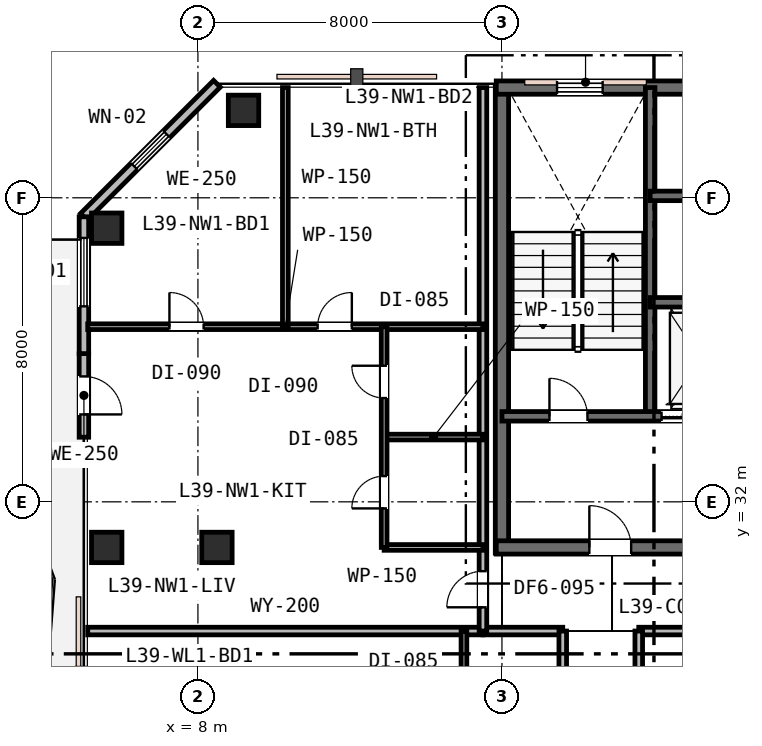
"""IFC4 building model, lengths in metres.
Left out: names, types, materials, properties, quantities, classifications, styles, units other than length and angle.
Written with IfcOpenShell. Run it as: python <this file> out.ifc"""

import sys

from ifc_helpers import new_model, si_unit, direction, frame, frame_2d, origin, origin_2d, place, context, subcontext, project, spatial, rectangle, extrude, element, fill, save


model = new_model("IFC4")
c1 = context("Model", 3, precision=1e-05, world=origin(), true_north=direction((0.0, 1.0)))
c2 = subcontext(c1, "Body", "Model", "MODEL_VIEW")
j1 = project(units=[si_unit("LENGTHUNIT", "METRE"), si_unit("PLANEANGLEUNIT", "RADIAN")], contexts=[c1])
p1 = place(None, origin())
s1 = spatial("IfcSite", under=j1, at=p1, CompositionType="ELEMENT")
p2 = place(p1, origin())
s2 = spatial("IfcBuilding", under=s1, at=p2, CompositionType="ELEMENT")
p3 = place(p2, frame((0.0, 0.0, 154.2)))
s3 = spatial("IfcBuildingStorey", under=s2, at=p3, CompositionType="ELEMENT", Elevation=154.2)
p4 = place(p3, frame((16.0, 30.65, 0.0), z_axis=(0.0, 0.0, 1.0), x_axis=(0.0, 1.0, 0.0)))
e1 = element("IfcWall", 1, at=p4, inside=s3, PredefinedType="SHEAR", context=c2, shape_type="SweptSolid", body=[
    extrude(rectangle(XDim=12.3, YDim=0.35, at=frame_2d((6.15, 0.0))), origin(), (0.0, 0.0, 1.0), 3.6),
])
p5 = place(p3, frame((15.85, 42.9, 0.0), z_axis=(0.0, 0.0, 1.0), x_axis=(1.0, 0.0, 0.0)))
e2 = element("IfcWall", 2, at=p5, inside=s3, PredefinedType="SHEAR", context=c2, shape_type="SweptSolid", body=[
    extrude(rectangle(XDim=24.3, YDim=0.35, at=frame_2d((12.15, 0.0))), origin(), (0.0, 0.0, 1.0), 3.6),
])
p6 = place(p5, frame((1.6, 0.0, 0.95)))
e3 = element("IfcOpeningElement", 3, at=p6, cuts=e2, PredefinedType="OPENING", context=c2, shape_type="SweptSolid", body=[
    extrude(rectangle(XDim=1.2, YDim=1.6, at=frame_2d((0.6, 0.8))), frame((0.0, 0.185, 0.0), z_axis=(0.0, -1.0, 0.0), x_axis=(1.0, 0.0, 0.0)), (0.0, 0.0, 1.0), 0.37),
])
p7 = place(p5, frame((16.5, 0.0, 0.95)))
e4 = element("IfcOpeningElement", 4, at=p7, cuts=e2, PredefinedType="OPENING", context=c2, shape_type="SweptSolid", body=[
    extrude(rectangle(XDim=1.2, YDim=1.6, at=frame_2d((0.6, 0.8))), frame((0.0, 0.185, 0.0), z_axis=(0.0, -1.0, 0.0), x_axis=(1.0, 0.0, 0.0)), (0.0, 0.0, 1.0), 0.37),
])
p8 = place(p5, frame((21.6, 0.0, 0.95)))
e5 = element("IfcOpeningElement", 5, at=p8, cuts=e2, PredefinedType="OPENING", context=c2, shape_type="SweptSolid", body=[
    extrude(rectangle(XDim=1.2, YDim=1.6, at=frame_2d((0.6, 0.8))), frame((0.0, 0.185, 0.0), z_axis=(0.0, -1.0, 0.0), x_axis=(1.0, 0.0, 0.0)), (0.0, 0.0, 1.0), 0.37),
])
p9 = place(p3, frame((15.85, 30.8, 0.0), z_axis=(0.0, 0.0, 1.0), x_axis=(1.0, 0.0, 0.0)))
e6 = element("IfcWall", 6, at=p9, inside=s3, PredefinedType="SHEAR", context=c2, shape_type="SweptSolid", body=[
    extrude(rectangle(XDim=11.2, YDim=0.35, at=frame_2d((5.6, 0.0))), origin(), (0.0, 0.0, 1.0), 3.6),
])
p10 = place(p9, frame((2.45, 0.0, 0.0)))
e7 = element("IfcOpeningElement", 7, at=p10, cuts=e6, PredefinedType="OPENING", context=c2, shape_type="SweptSolid", body=[
    extrude(rectangle(XDim=1.1, YDim=2.15, at=frame_2d((0.55, 1.075))), frame((0.0, 0.185, 0.0), z_axis=(0.0, -1.0, 0.0), x_axis=(1.0, 0.0, 0.0)), (0.0, 0.0, 1.0), 0.37),
])
p11 = place(p3, frame((19.9, 34.25, 0.0), z_axis=(0.0, 0.0, 1.0), x_axis=(0.0, 1.0, 0.0)))
e8 = element("IfcWall", 8, at=p11, inside=s3, PredefinedType="SHEAR", context=c2, shape_type="SweptSolid", body=[
    extrude(rectangle(XDim=8.65, YDim=0.25, at=frame_2d((4.325, 0.0))), origin(), (0.0, 0.0, 1.0), 3.6),
])
p12 = place(p3, frame((16.0, 34.25, 0.0), z_axis=(0.0, 0.0, 1.0), x_axis=(1.0, 0.0, 0.0)))
e9 = element("IfcWall", 9, at=p12, inside=s3, PredefinedType="SHEAR", context=c2, shape_type="SweptSolid", body=[
    extrude(rectangle(XDim=6.05, YDim=0.25, at=frame_2d((3.025, 0.0))), origin(), (0.0, 0.0, 1.0), 3.6),
])
p13 = place(p12, frame((1.25, 0.0, 0.0)))
e10 = element("IfcOpeningElement", 10, at=p13, cuts=e9, PredefinedType="OPENING", context=c2, shape_type="SweptSolid", body=[
    extrude(rectangle(XDim=1.0, YDim=2.15, at=frame_2d((0.5, 1.075))), frame((0.0, 0.135, 0.0), z_axis=(0.0, -1.0, 0.0), x_axis=(1.0, 0.0, 0.0)), (0.0, 0.0, 1.0), 0.27),
])
p14 = place(p12, frame((4.2, 0.0, 0.0)))
e11 = element("IfcOpeningElement", 11, at=p14, cuts=e9, PredefinedType="OPENING", context=c2, shape_type="SweptSolid", body=[
    extrude(rectangle(XDim=1.1, YDim=2.15, at=frame_2d((0.55, 1.075))), frame((0.0, 0.135, 0.0), z_axis=(0.0, -1.0, 0.0), x_axis=(1.0, 0.0, 0.0)), (0.0, 0.0, 1.0), 0.27),
])
p15 = place(p3, frame((19.9, 37.25, 0.0), z_axis=(0.0, 0.0, 1.0), x_axis=(1.0, 0.0, 0.0)))
e12 = element("IfcWall", 12, at=p15, inside=s3, PredefinedType="SHEAR", context=c2, shape_type="SweptSolid", body=[
    extrude(rectangle(XDim=16.2, YDim=0.25, at=frame_2d((8.1, 0.0))), origin(), (0.0, 0.0, 1.0), 3.6),
])
p16 = place(p15, frame((12.55, 0.0, 0.0)))
e13 = element("IfcOpeningElement", 13, at=p16, cuts=e12, PredefinedType="OPENING", context=c2, shape_type="SweptSolid", body=[
    extrude(rectangle(XDim=0.9, YDim=2.15, at=frame_2d((0.45, 1.075))), frame((0.0, 0.135, 0.0), z_axis=(0.0, -1.0, 0.0), x_axis=(1.0, 0.0, 0.0)), (0.0, 0.0, 1.0), 0.27),
])
p17 = place(p15, frame((2.5, 0.0, 0.0)))
e14 = element("IfcOpeningElement", 14, at=p17, cuts=e12, PredefinedType="OPENING", context=c2, shape_type="SweptSolid", body=[
    extrude(rectangle(XDim=1.05, YDim=2.15, at=frame_2d((0.525, 1.075))), frame((0.0, 0.135, 0.0), z_axis=(0.0, -1.0, 0.0), x_axis=(1.0, 0.0, 0.0)), (0.0, 0.0, 1.0), 0.27),
])
p18 = place(p15, frame((4.4, 0.0, 0.0)))
e15 = element("IfcOpeningElement", 15, at=p18, cuts=e12, PredefinedType="OPENING", context=c2, shape_type="SweptSolid", body=[
    extrude(rectangle(XDim=1.05, YDim=2.15, at=frame_2d((0.525, 1.075))), frame((0.0, 0.135, 0.0), z_axis=(0.0, -1.0, 0.0), x_axis=(1.0, 0.0, 0.0)), (0.0, 0.0, 1.0), 0.27),
])
p19 = place(p15, frame((6.3, 0.0, 0.0)))
e16 = element("IfcOpeningElement", 16, at=p19, cuts=e12, PredefinedType="OPENING", context=c2, shape_type="SweptSolid", body=[
    extrude(rectangle(XDim=1.05, YDim=2.15, at=frame_2d((0.525, 1.075))), frame((0.0, 0.135, 0.0), z_axis=(0.0, -1.0, 0.0), x_axis=(1.0, 0.0, 0.0)), (0.0, 0.0, 1.0), 0.27),
])
p20 = place(p3, frame((19.9, 40.05, 0.0), z_axis=(0.0, 0.0, 1.0), x_axis=(1.0, 0.0, 0.0)))
e17 = element("IfcWall", 17, at=p20, inside=s3, PredefinedType="SHEAR", context=c2, shape_type="SweptSolid", body=[
    extrude(rectangle(XDim=12.05, YDim=0.25, at=frame_2d((6.025, 0.0))), origin(), (0.0, 0.0, 1.0), 3.6),
])
for number, where, z_axis, x_axis in (
    (18, (5.6, 30.8, 0.0), (0.0, 0.0, 1.0), (1.0, 0.0, 0.0)),
    (19, (5.6, 39.2, 0.0), (0.0, 0.0, 1.0), (1.0, 0.0, 0.0)),
    (20, (8.5, 30.8, 0.0), (0.0, 0.0, 1.0), (1.0, 0.0, 0.0)),
    (21, (9.2, 42.3, 0.0), (0.0, 0.0, 1.0), (1.0, 0.0, 0.0)),
):
    element("IfcColumn", number, at=place(p3, frame(where, z_axis=z_axis, x_axis=x_axis)), inside=s3, PredefinedType="COLUMN", context=c2, shape_type="SweptSolid", body=[
        extrude(rectangle(XDim=0.8, YDim=0.8, at=origin_2d()), origin(), (0.0, 0.0, 1.0), 3.6),
    ])
p21 = place(p3, frame((8.5, 43.0, 0.0), z_axis=(0.0, 0.0, 1.0), x_axis=(-0.707106781187, -0.707106781187, 0.0)))
e22 = element("IfcWall", 22, at=p21, inside=s3, PredefinedType="STANDARD", context=c2, shape_type="SweptSolid", body=[
    extrude(rectangle(XDim=4.95, YDim=0.25, at=frame_2d((2.475, 0.0))), origin(), (0.0, 0.0, 1.0), 3.33),
])
p22 = place(p21, frame((1.875, 0.0, 0.85)))
e23 = element("IfcOpeningElement", 23, at=p22, cuts=e22, PredefinedType="OPENING", context=c2, shape_type="SweptSolid", body=[
    extrude(rectangle(XDim=1.2, YDim=1.6, at=frame_2d((0.6, 0.8))), frame((0.0, 0.135, 0.0), z_axis=(0.0, -1.0, 0.0), x_axis=(1.0, 0.0, 0.0)), (0.0, 0.0, 1.0), 0.27),
])
p23 = place(p3, frame((5.0, 35.9, 0.0), z_axis=(0.0, 0.0, 1.0), x_axis=(0.0, -1.0, 0.0)))
e24 = element("IfcWall", 24, at=p23, inside=s3, PredefinedType="STANDARD", context=c2, shape_type="SweptSolid", body=[
    extrude(rectangle(XDim=2.2, YDim=0.25, at=frame_2d((1.1, 0.0))), origin(), (0.0, 0.0, 1.0), 3.33),
])
p24 = place(p23, frame((0.6, 0.0, 0.0)))
e25 = element("IfcOpeningElement", 25, at=p24, cuts=e24, PredefinedType="OPENING", context=c2, shape_type="SweptSolid", body=[
    extrude(rectangle(XDim=1.0, YDim=2.15, at=frame_2d((0.5, 1.075))), frame((0.0, 0.135, 0.0), z_axis=(0.0, -1.0, 0.0), x_axis=(1.0, 0.0, 0.0)), (0.0, 0.0, 1.0), 0.27),
])
p25 = place(p3, frame((5.0, 39.5, 0.0), z_axis=(0.0, 0.0, 1.0), x_axis=(0.0, -1.0, 0.0)))
e26 = element("IfcWall", 26, at=p25, inside=s3, PredefinedType="STANDARD", context=c2, shape_type="SweptSolid", body=[
    extrude(rectangle(XDim=3.6, YDim=0.25, at=frame_2d((1.8, 0.0))), origin(), (0.0, 0.0, 1.0), 3.33),
])
p26 = place(p25, frame((0.556, 0.0, 0.75)))
e27 = element("IfcOpeningElement", 27, at=p26, cuts=e26, PredefinedType="OPENING", context=c2, shape_type="SweptSolid", body=[
    extrude(rectangle(XDim=1.8, YDim=1.85, at=frame_2d((0.9, 0.925))), frame((0.0, 0.135, 0.0), z_axis=(0.0, -1.0, 0.0), x_axis=(1.0, 0.0, 0.0)), (0.0, 0.0, 1.0), 0.27),
])
p27 = place(p3, frame((5.1, 28.6, 0.0), z_axis=(0.0, 0.0, 1.0), x_axis=(1.0, 0.0, 0.0)))
e28 = element("IfcWall", 28, at=p27, inside=s3, PredefinedType="PARTITIONING", context=c2, shape_type="SweptSolid", body=[
    extrude(rectangle(XDim=10.4, YDim=0.2, at=frame_2d((5.2, 0.0))), origin(), (0.0, 0.0, 1.0), 2.93),
])
p28 = place(p3, frame((15.5, 28.6, 0.0), z_axis=(0.0, 0.0, 1.0), x_axis=(1.0, 0.0, 0.0)))
e29 = element("IfcWall", 29, at=p28, inside=s3, PredefinedType="PARTITIONING", context=c2, shape_type="SweptSolid", body=[
    extrude(rectangle(XDim=2.1, YDim=0.2, at=frame_2d((1.05, 0.0))), origin(), (0.0, 0.0, 1.0), 2.93),
])
p29 = place(p3, frame((19.6, 28.6, 0.0), z_axis=(0.0, 0.0, 1.0), x_axis=(1.0, 0.0, 0.0)))
e30 = element("IfcWall", 30, at=p29, inside=s3, PredefinedType="PARTITIONING", context=c2, shape_type="SweptSolid", body=[
    extrude(rectangle(XDim=31.3, YDim=0.2, at=frame_2d((15.65, 0.0))), origin(), (0.0, 0.0, 1.0), 2.93),
])
p30 = place(p29, frame((5.445, 0.0, 0.0)))
e31 = element("IfcOpeningElement", 31, at=p30, cuts=e30, PredefinedType="OPENING", context=c2, shape_type="SweptSolid", body=[
    extrude(rectangle(XDim=0.95, YDim=2.15, at=frame_2d((0.475, 1.075))), frame((0.0, 0.11, 0.0), z_axis=(0.0, -1.0, 0.0), x_axis=(1.0, 0.0, 0.0)), (0.0, 0.0, 1.0), 0.22),
])
p31 = place(p29, frame((13.35, 0.0, 0.0)))
e32 = element("IfcOpeningElement", 32, at=p31, cuts=e30, PredefinedType="OPENING", context=c2, shape_type="SweptSolid", body=[
    extrude(rectangle(XDim=0.95, YDim=2.15, at=frame_2d((0.475, 1.075))), frame((0.0, 0.11, 0.0), z_axis=(0.0, -1.0, 0.0), x_axis=(1.0, 0.0, 0.0)), (0.0, 0.0, 1.0), 0.22),
])
p32 = place(p29, frame((21.925, 0.0, 0.0)))
e33 = element("IfcOpeningElement", 33, at=p32, cuts=e30, PredefinedType="OPENING", context=c2, shape_type="SweptSolid", body=[
    extrude(rectangle(XDim=0.95, YDim=2.15, at=frame_2d((0.475, 1.075))), frame((0.0, 0.11, 0.0), z_axis=(0.0, -1.0, 0.0), x_axis=(1.0, 0.0, 0.0)), (0.0, 0.0, 1.0), 0.22),
])
p33 = place(p3, frame((15.5, 28.6, 0.0), z_axis=(0.0, 0.0, 1.0), x_axis=(0.0, 1.0, 0.0)))
e34 = element("IfcWall", 34, at=p33, inside=s3, PredefinedType="PARTITIONING", context=c2, shape_type="SweptSolid", body=[
    extrude(rectangle(XDim=14.3, YDim=0.2, at=frame_2d((7.15, 0.0))), origin(), (0.0, 0.0, 1.0), 2.93),
])
p34 = place(p33, frame((0.625, 0.0, 0.0)))
e35 = element("IfcOpeningElement", 35, at=p34, cuts=e34, PredefinedType="OPENING", context=c2, shape_type="SweptSolid", body=[
    extrude(rectangle(XDim=0.95, YDim=2.15, at=frame_2d((0.475, 1.075))), frame((0.0, 0.11, 0.0), z_axis=(0.0, -1.0, 0.0), x_axis=(1.0, 0.0, 0.0)), (0.0, 0.0, 1.0), 0.22),
])
p35 = place(p3, frame((12.9, 30.8, 0.0), z_axis=(0.0, 0.0, 1.0), x_axis=(1.0, 0.0, 0.0)))
e36 = element("IfcWall", 36, at=p35, inside=s3, PredefinedType="PARTITIONING", context=c2, shape_type="SweptSolid", body=[
    extrude(rectangle(XDim=2.6, YDim=0.15, at=frame_2d((1.3, 0.0))), origin(), (0.0, 0.0, 1.0), 2.93),
])
p36 = place(p3, frame((12.9, 33.704, 0.0), z_axis=(0.0, 0.0, 1.0), x_axis=(1.0, 0.0, 0.0)))
e37 = element("IfcWall", 37, at=p36, inside=s3, PredefinedType="PARTITIONING", context=c2, shape_type="SweptSolid", body=[
    extrude(rectangle(XDim=2.6, YDim=0.15, at=frame_2d((1.3, 0.0))), origin(), (0.0, 0.0, 1.0), 3.33),
])
p37 = place(p3, frame((5.1, 36.608, 0.0), z_axis=(0.0, 0.0, 1.0), x_axis=(1.0, 0.0, 0.0)))
e38 = element("IfcWall", 38, at=p37, inside=s3, PredefinedType="PARTITIONING", context=c2, shape_type="SweptSolid", body=[
    extrude(rectangle(XDim=10.4, YDim=0.15, at=frame_2d((5.2, 0.0))), origin(), (0.0, 0.0, 1.0), 3.01),
])
p38 = place(p37, frame((2.15, 0.0, 0.0)))
e39 = element("IfcOpeningElement", 39, at=p38, cuts=e38, PredefinedType="OPENING", context=c2, shape_type="SweptSolid", body=[
    extrude(rectangle(XDim=0.9, YDim=2.15, at=frame_2d((0.45, 1.075))), frame((0.0, 0.085, 0.0), z_axis=(0.0, -1.0, 0.0), x_axis=(1.0, 0.0, 0.0)), (0.0, 0.0, 1.0), 0.17),
])
p39 = place(p37, frame((6.05, 0.0, 0.0)))
e40 = element("IfcOpeningElement", 40, at=p39, cuts=e38, PredefinedType="OPENING", context=c2, shape_type="SweptSolid", body=[
    extrude(rectangle(XDim=0.9, YDim=2.15, at=frame_2d((0.45, 1.075))), frame((0.0, 0.085, 0.0), z_axis=(0.0, -1.0, 0.0), x_axis=(1.0, 0.0, 0.0)), (0.0, 0.0, 1.0), 0.17),
])
p40 = place(p3, frame((12.9, 30.8, 0.0), z_axis=(0.0, 0.0, 1.0), x_axis=(0.0, 1.0, 0.0)))
e41 = element("IfcWall", 41, at=p40, inside=s3, PredefinedType="PARTITIONING", context=c2, shape_type="SweptSolid", body=[
    extrude(rectangle(XDim=5.808, YDim=0.15, at=frame_2d((2.904, 0.0))), origin(), (0.0, 0.0, 1.0), 2.93),
])
p41 = place(p40, frame((1.027, 0.0, 0.0)))
e42 = element("IfcOpeningElement", 42, at=p41, cuts=e41, PredefinedType="OPENING", context=c2, shape_type="SweptSolid", body=[
    extrude(rectangle(XDim=0.85, YDim=2.15, at=frame_2d((0.425, 1.075))), frame((0.0, 0.085, 0.0), z_axis=(0.0, -1.0, 0.0), x_axis=(1.0, 0.0, 0.0)), (0.0, 0.0, 1.0), 0.17),
])
p42 = place(p40, frame((3.931, 0.0, 0.0)))
e43 = element("IfcOpeningElement", 43, at=p42, cuts=e41, PredefinedType="OPENING", context=c2, shape_type="SweptSolid", body=[
    extrude(rectangle(XDim=0.85, YDim=2.15, at=frame_2d((0.425, 1.075))), frame((0.0, 0.085, 0.0), z_axis=(0.0, -1.0, 0.0), x_axis=(1.0, 0.0, 0.0)), (0.0, 0.0, 1.0), 0.17),
])
p43 = place(p3, frame((10.3, 36.608, 0.0), z_axis=(0.0, 0.0, 1.0), x_axis=(0.0, 1.0, 0.0)))
e44 = element("IfcWall", 44, at=p43, inside=s3, PredefinedType="PARTITIONING", context=c2, shape_type="SweptSolid", body=[
    extrude(rectangle(XDim=6.292, YDim=0.15, at=frame_2d((3.146, 0.0))), origin(), (0.0, 0.0, 1.0), 3.33),
])
p44 = place(p3, frame((17.6, 17.0, 0.0), z_axis=(0.0, 0.0, 1.0), x_axis=(0.0, 1.0, 0.0)))
e45 = element("IfcWall", 45, at=p44, inside=s3, PredefinedType="PARTITIONING", context=c2, shape_type="SweptSolid", body=[
    extrude(rectangle(XDim=11.6, YDim=0.2, at=frame_2d((5.8, 0.0))), origin(), (0.0, 0.0, 1.0), 2.93),
])
p45 = place(p44, frame((0.723, 0.0, 0.0)))
e46 = element("IfcOpeningElement", 46, at=p45, cuts=e45, PredefinedType="OPENING", context=c2, shape_type="SweptSolid", body=[
    extrude(rectangle(XDim=0.95, YDim=2.15, at=frame_2d((0.475, 1.075))), frame((0.0, 0.11, 0.0), z_axis=(0.0, -1.0, 0.0), x_axis=(1.0, 0.0, 0.0)), (0.0, 0.0, 1.0), 0.22),
])
p46 = place(p3, frame((15.0, 19.396, 0.0), z_axis=(0.0, 0.0, 1.0), x_axis=(0.0, 1.0, 0.0)))
e47 = element("IfcWall", 47, at=p46, inside=s3, PredefinedType="PARTITIONING", context=c2, shape_type="SweptSolid", body=[
    extrude(rectangle(XDim=9.204, YDim=0.15, at=frame_2d((4.602, 0.0))), origin(), (0.0, 0.0, 1.0), 2.93),
])
p47 = place(p46, frame((0.6, 0.0, 0.0)))
e48 = element("IfcOpeningElement", 48, at=p47, cuts=e47, PredefinedType="OPENING", context=c2, shape_type="SweptSolid", body=[
    extrude(rectangle(XDim=0.85, YDim=2.15, at=frame_2d((0.425, 1.075))), frame((0.0, 0.085, 0.0), z_axis=(0.0, -1.0, 0.0), x_axis=(1.0, 0.0, 0.0)), (0.0, 0.0, 1.0), 0.17),
])
p48 = place(p46, frame((2.65, 0.0, 0.0)))
e49 = element("IfcOpeningElement", 49, at=p48, cuts=e47, PredefinedType="OPENING", context=c2, shape_type="SweptSolid", body=[
    extrude(rectangle(XDim=0.85, YDim=2.15, at=frame_2d((0.425, 1.075))), frame((0.0, 0.085, 0.0), z_axis=(0.0, -1.0, 0.0), x_axis=(1.0, 0.0, 0.0)), (0.0, 0.0, 1.0), 0.17),
])
p49 = place(p46, frame((6.593, 0.0, 0.0)))
e50 = element("IfcOpeningElement", 50, at=p49, cuts=e47, PredefinedType="OPENING", context=c2, shape_type="SweptSolid", body=[
    extrude(rectangle(XDim=0.85, YDim=2.15, at=frame_2d((0.425, 1.075))), frame((0.0, 0.085, 0.0), z_axis=(0.0, -1.0, 0.0), x_axis=(1.0, 0.0, 0.0)), (0.0, 0.0, 1.0), 0.17),
])
p50 = place(p3, frame((19.6, 17.0, 0.0), z_axis=(0.0, 0.0, 1.0), x_axis=(0.0, 1.0, 0.0)))
e51 = element("IfcWall", 51, at=p50, inside=s3, PredefinedType="PARTITIONING", context=c2, shape_type="SweptSolid", body=[
    extrude(rectangle(XDim=11.6, YDim=0.2, at=frame_2d((5.8, 0.0))), origin(), (0.0, 0.0, 1.0), 2.93),
])
p51 = place(p50, frame((3.125, 0.0, 0.0)))
e52 = element("IfcOpeningElement", 52, at=p51, cuts=e51, PredefinedType="OPENING", context=c2, shape_type="SweptSolid", body=[
    extrude(rectangle(XDim=0.95, YDim=2.15, at=frame_2d((0.475, 1.075))), frame((0.0, 0.11, 0.0), z_axis=(0.0, -1.0, 0.0), x_axis=(1.0, 0.0, 0.0)), (0.0, 0.0, 1.0), 0.22),
])
p52 = place(p6, origin())
e53 = element("IfcWindow", 53, at=p52, inside=s3, PartitioningType="SINGLE_PANEL", PredefinedType="WINDOW", context=c2, shape_type="SweptSolid", body=[
    extrude(rectangle(XDim=1.2, YDim=1.6, at=frame_2d((0.6, 0.8))), frame((0.0, 0.03, 0.0), z_axis=(0.0, -1.0, 0.0), x_axis=(1.0, 0.0, 0.0)), (0.0, 0.0, 1.0), 0.06),
])
fill(e3, e53)
p53 = place(p22, origin())
e54 = element("IfcWindow", 54, at=p53, inside=s3, PartitioningType="SINGLE_PANEL", PredefinedType="WINDOW", context=c2, shape_type="SweptSolid", body=[
    extrude(rectangle(XDim=1.2, YDim=1.6, at=frame_2d((0.6, 0.8))), frame((0.0, 0.03, 0.0), z_axis=(0.0, -1.0, 0.0), x_axis=(1.0, 0.0, 0.0)), (0.0, 0.0, 1.0), 0.06),
])
fill(e23, e54)
p54 = place(p24, origin())
e55 = element("IfcDoor", 55, at=p54, inside=s3, OperationType="SINGLE_SWING_RIGHT", PredefinedType="DOOR", context=c2, shape_type="SweptSolid", body=[
    extrude(rectangle(XDim=1.0, YDim=2.15, at=frame_2d((0.5, 1.075))), frame((0.0, 0.025, 0.0), z_axis=(0.0, -1.0, 0.0), x_axis=(1.0, 0.0, 0.0)), (0.0, 0.0, 1.0), 0.05),
])
fill(e25, e55)
p55 = place(p26, origin())
e56 = element("IfcWindow", 56, at=p55, inside=s3, PartitioningType="SINGLE_PANEL", PredefinedType="WINDOW", context=c2, shape_type="SweptSolid", body=[
    extrude(rectangle(XDim=1.8, YDim=1.85, at=frame_2d((0.9, 0.925))), frame((0.0, 0.03, 0.0), z_axis=(0.0, -1.0, 0.0), x_axis=(1.0, 0.0, 0.0)), (0.0, 0.0, 1.0), 0.06),
])
fill(e27, e56)
p56 = place(p13, origin())
e57 = element("IfcDoor", 57, at=p56, inside=s3, OperationType="SINGLE_SWING_LEFT", PredefinedType="DOOR", context=c2, shape_type="SweptSolid", body=[
    extrude(rectangle(XDim=1.0, YDim=2.15, at=frame_2d((0.5, 1.075))), frame((0.0, 0.025, 0.0), z_axis=(0.0, -1.0, 0.0), x_axis=(1.0, 0.0, 0.0)), (0.0, 0.0, 1.0), 0.05),
])
fill(e10, e57)
p57 = place(p10, origin())
e58 = element("IfcDoor", 58, at=p57, inside=s3, OperationType="SINGLE_SWING_LEFT", PredefinedType="DOOR", context=c2, shape_type="SweptSolid", body=[
    extrude(rectangle(XDim=1.1, YDim=2.15, at=frame_2d((0.55, 1.075))), frame((0.0, 0.025, 0.0), z_axis=(0.0, -1.0, 0.0), x_axis=(1.0, 0.0, 0.0)), (0.0, 0.0, 1.0), 0.05),
])
fill(e7, e58)
p58 = place(p34, origin())
e59 = element("IfcDoor", 59, at=p58, inside=s3, OperationType="SINGLE_SWING_LEFT", PredefinedType="DOOR", context=c2, shape_type="SweptSolid", body=[
    extrude(rectangle(XDim=0.95, YDim=2.15, at=frame_2d((0.475, 1.075))), frame((0.0, 0.025, 0.0), z_axis=(0.0, -1.0, 0.0), x_axis=(1.0, 0.0, 0.0)), (0.0, 0.0, 1.0), 0.05),
])
fill(e35, e59)
p59 = place(p41, origin())
e60 = element("IfcDoor", 60, at=p59, inside=s3, OperationType="SINGLE_SWING_LEFT", PredefinedType="DOOR", context=c2, shape_type="SweptSolid", body=[
    extrude(rectangle(XDim=0.85, YDim=2.15, at=frame_2d((0.425, 1.075))), frame((0.0, 0.025, 0.0), z_axis=(0.0, -1.0, 0.0), x_axis=(1.0, 0.0, 0.0)), (0.0, 0.0, 1.0), 0.05),
])
fill(e42, e60)
p60 = place(p42, origin())
e61 = element("IfcDoor", 61, at=p60, inside=s3, OperationType="SINGLE_SWING_RIGHT", PredefinedType="DOOR", context=c2, shape_type="SweptSolid", body=[
    extrude(rectangle(XDim=0.85, YDim=2.15, at=frame_2d((0.425, 1.075))), frame((0.0, 0.025, 0.0), z_axis=(0.0, -1.0, 0.0), x_axis=(1.0, 0.0, 0.0)), (0.0, 0.0, 1.0), 0.05),
])
fill(e43, e61)
p61 = place(p38, origin())
e62 = element("IfcDoor", 62, at=p61, inside=s3, OperationType="SINGLE_SWING_LEFT", PredefinedType="DOOR", context=c2, shape_type="SweptSolid", body=[
    extrude(rectangle(XDim=0.9, YDim=2.15, at=frame_2d((0.45, 1.075))), frame((0.0, 0.025, 0.0), z_axis=(0.0, -1.0, 0.0), x_axis=(1.0, 0.0, 0.0)), (0.0, 0.0, 1.0), 0.05),
])
fill(e39, e62)
p62 = place(p39, origin())
e63 = element("IfcDoor", 63, at=p62, inside=s3, OperationType="SINGLE_SWING_RIGHT", PredefinedType="DOOR", context=c2, shape_type="SweptSolid", body=[
    extrude(rectangle(XDim=0.9, YDim=2.15, at=frame_2d((0.45, 1.075))), frame((0.0, 0.025, 0.0), z_axis=(0.0, -1.0, 0.0), x_axis=(1.0, 0.0, 0.0)), (0.0, 0.0, 1.0), 0.05),
])
fill(e40, e63)
p63 = place(p14, origin())
e64 = element("IfcDoor", 64, at=p63, inside=s3, OperationType="DOUBLE_DOOR_SLIDING", PredefinedType="DOOR", context=c2, shape_type="SweptSolid", body=[
    extrude(rectangle(XDim=1.1, YDim=2.15, at=frame_2d((0.55, 1.075))), frame((0.0, 0.025, 0.0), z_axis=(0.0, -1.0, 0.0), x_axis=(1.0, 0.0, 0.0)), (0.0, 0.0, 1.0), 0.05),
])
fill(e11, e64)
save(model, sys.argv[1])
